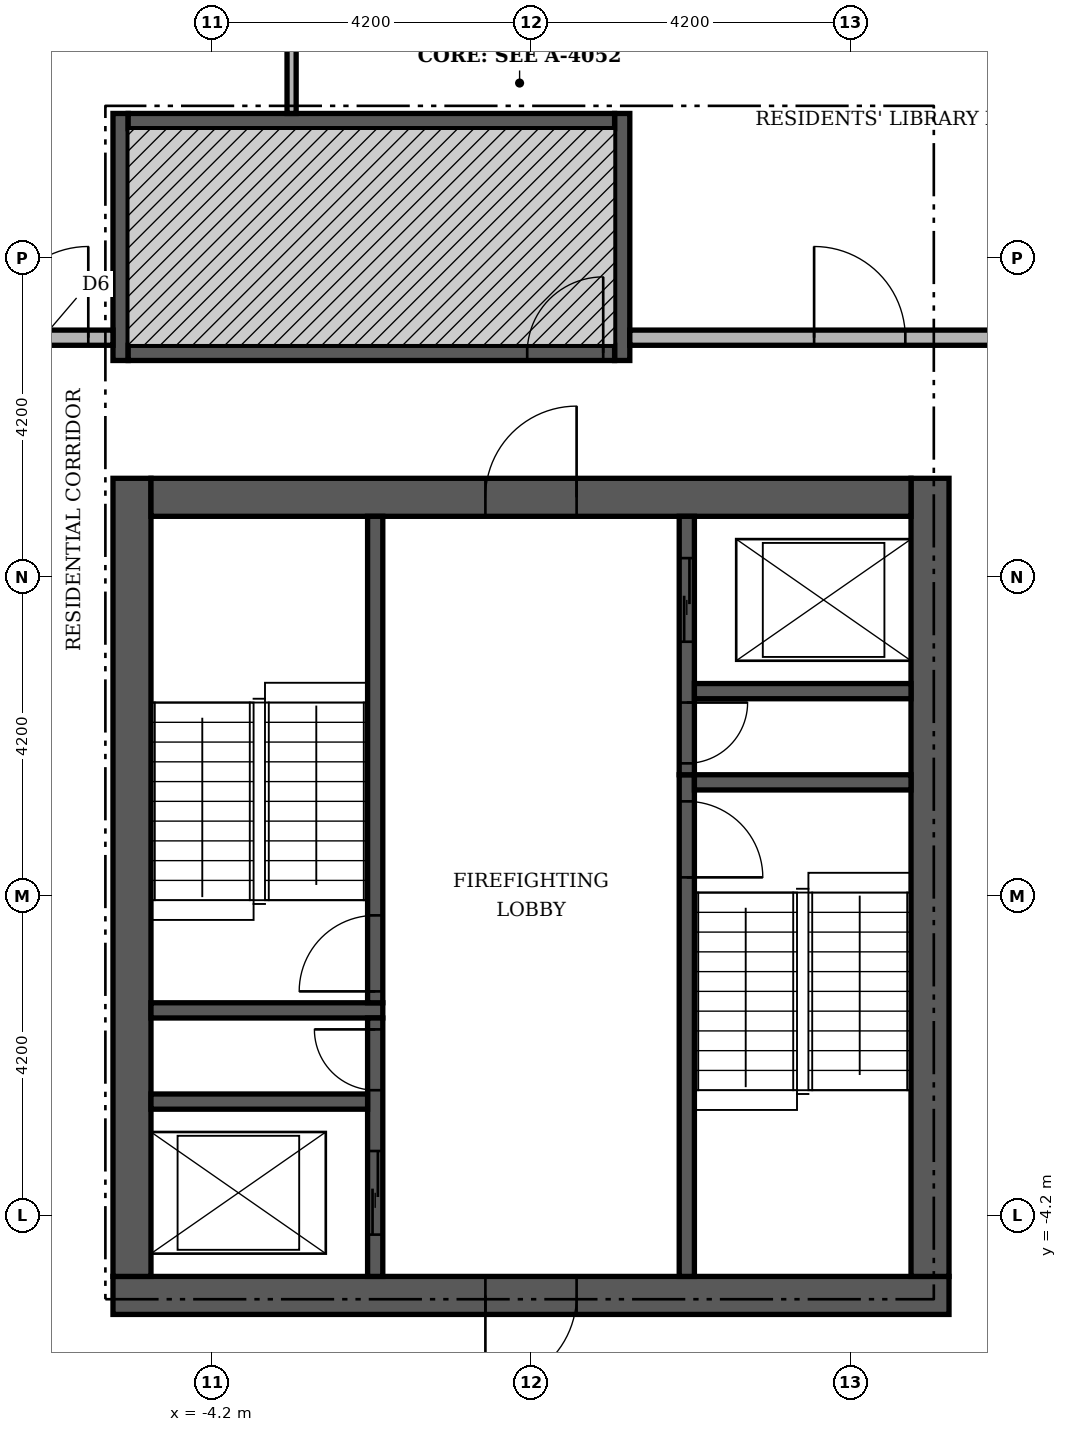
"""IFC4 building model, lengths in metres.
Left out: names, types, materials, properties, quantities, classifications, styles, units other than length and angle.
Written with IfcOpenShell. Run it as: python <this file> out.ifc"""

import sys

from ifc_helpers import new_model, si_unit, direction, frame, frame_2d, origin, place, context, subcontext, project, spatial, rectangle, extrude, element, fill, save


model = new_model("IFC4")
c1 = context("Model", 3, precision=1e-05, world=origin(), true_north=direction((0.0, 1.0)))
c2 = subcontext(c1, "Body", "Model", "MODEL_VIEW")
j1 = project(units=[si_unit("LENGTHUNIT", "METRE"), si_unit("PLANEANGLEUNIT", "RADIAN")], contexts=[c1])
p1 = place(None, origin())
s1 = spatial("IfcSite", under=j1, at=p1, CompositionType="ELEMENT")
p2 = place(p1, origin())
s2 = spatial("IfcBuilding", under=s1, at=p2, CompositionType="ELEMENT")
p3 = place(p2, frame((0.0, 0.0, 312.3)))
s3 = spatial("IfcBuildingStorey", under=s2, at=p3, CompositionType="ELEMENT", Elevation=312.3)
p4 = place(p3, frame((-5.5, -5.25, 0.0), z_axis=(0.0, 0.0, 1.0), x_axis=(1.0, 0.0, 0.0)))
e1 = element("IfcWall", 1, at=p4, inside=s3, PredefinedType="SHEAR", context=c2, shape_type="SweptSolid", body=[
    extrude(rectangle(XDim=11.0, YDim=0.5, at=frame_2d((5.5, 0.0))), origin(), (0.0, 0.0, 1.0), 3.55),
])
p5 = place(p4, frame((4.9, 0.0, 0.0)))
e2 = element("IfcOpeningElement", 2, at=p5, cuts=e1, PredefinedType="OPENING", context=c2, shape_type="SweptSolid", body=[
    extrude(rectangle(XDim=1.2, YDim=2.1, at=frame_2d((0.6, 1.05))), frame((0.0, 0.26, 0.0), z_axis=(0.0, -1.0, 0.0), x_axis=(1.0, 0.0, 0.0)), (0.0, 0.0, 1.0), 0.52),
])
for number, where, z_axis, x_axis in (
    (3, (-5.25, -5.0, 0.0), (0.0, 0.0, 1.0), (0.0, 1.0, 0.0)),
    (4, (5.25, -5.0, 0.0), (0.0, 0.0, 1.0), (0.0, 1.0, 0.0)),
):
    element("IfcWall", number, at=place(p3, frame(where, z_axis=z_axis, x_axis=x_axis)), inside=s3, PredefinedType="SHEAR", context=c2, shape_type="SweptSolid", body=[
        extrude(rectangle(XDim=10.5, YDim=0.5, at=frame_2d((5.25, 0.0))), origin(), (0.0, 0.0, 1.0), 3.55),
    ])
p6 = place(p3, frame((-5.0, 5.25, 0.0), z_axis=(0.0, 0.0, 1.0), x_axis=(1.0, 0.0, 0.0)))
e5 = element("IfcWall", 5, at=p6, inside=s3, PredefinedType="SHEAR", context=c2, shape_type="SweptSolid", body=[
    extrude(rectangle(XDim=10.0, YDim=0.5, at=frame_2d((5.0, 0.0))), origin(), (0.0, 0.0, 1.0), 3.55),
])
p7 = place(p6, frame((4.4, 0.0, 0.0)))
e6 = element("IfcOpeningElement", 6, at=p7, cuts=e5, PredefinedType="OPENING", context=c2, shape_type="SweptSolid", body=[
    extrude(rectangle(XDim=1.2, YDim=2.1, at=frame_2d((0.6, 1.05))), frame((0.0, 0.26, 0.0), z_axis=(0.0, -1.0, 0.0), x_axis=(1.0, 0.0, 0.0)), (0.0, 0.0, 1.0), 0.52),
])
p8 = place(p3, frame((2.05, -5.0, 0.0), z_axis=(0.0, 0.0, 1.0), x_axis=(0.0, 1.0, 0.0)))
e7 = element("IfcWall", 7, at=p8, inside=s3, PredefinedType="SHEAR", context=c2, shape_type="SweptSolid", body=[
    extrude(rectangle(XDim=6.6, YDim=0.2, at=frame_2d((3.3, 0.0))), origin(), (0.0, 0.0, 1.0), 3.55),
])
p9 = place(p8, frame((5.25, 0.0, 0.0)))
e8 = element("IfcOpeningElement", 8, at=p9, cuts=e7, PredefinedType="OPENING", context=c2, shape_type="SweptSolid", body=[
    extrude(rectangle(XDim=1.0, YDim=2.1, at=frame_2d((0.5, 1.05))), frame((0.0, 0.11, 0.0), z_axis=(0.0, -1.0, 0.0), x_axis=(1.0, 0.0, 0.0)), (0.0, 0.0, 1.0), 0.22),
])
p10 = place(p3, frame((-5.0, -1.5, 0.0), z_axis=(0.0, 0.0, 1.0), x_axis=(1.0, 0.0, 0.0)))
e9 = element("IfcWall", 9, at=p10, inside=s3, PredefinedType="SHEAR", context=c2, shape_type="SweptSolid", body=[
    extrude(rectangle(XDim=3.05, YDim=0.2, at=frame_2d((1.525, 0.0))), origin(), (0.0, 0.0, 1.0), 3.55),
])
p11 = place(p3, frame((-2.05, -1.4, 0.0), z_axis=(0.0, 0.0, 1.0), x_axis=(0.0, 1.0, 0.0)))
e10 = element("IfcWall", 10, at=p11, inside=s3, PredefinedType="SHEAR", context=c2, shape_type="SweptSolid", body=[
    extrude(rectangle(XDim=6.4, YDim=0.2, at=frame_2d((3.2, 0.0))), origin(), (0.0, 0.0, 1.0), 3.55),
])
p12 = place(p11, frame((0.15, 0.0, 0.0)))
e11 = element("IfcOpeningElement", 11, at=p12, cuts=e10, PredefinedType="OPENING", context=c2, shape_type="SweptSolid", body=[
    extrude(rectangle(XDim=1.0, YDim=2.1, at=frame_2d((0.5, 1.05))), frame((0.0, 0.11, 0.0), z_axis=(0.0, -1.0, 0.0), x_axis=(1.0, 0.0, 0.0)), (0.0, 0.0, 1.0), 0.22),
])
p13 = place(p3, frame((2.15, 1.5, 0.0), z_axis=(0.0, 0.0, 1.0), x_axis=(1.0, 0.0, 0.0)))
e12 = element("IfcWall", 12, at=p13, inside=s3, PredefinedType="SHEAR", context=c2, shape_type="SweptSolid", body=[
    extrude(rectangle(XDim=2.85, YDim=0.2, at=frame_2d((1.425, 0.0))), origin(), (0.0, 0.0, 1.0), 3.55),
])
p14 = place(p3, frame((-2.05, -5.0, 0.0), z_axis=(0.0, 0.0, 1.0), x_axis=(0.0, 1.0, 0.0)))
e13 = element("IfcWall", 13, at=p14, inside=s3, PredefinedType="SHEAR", context=c2, shape_type="SweptSolid", body=[
    extrude(rectangle(XDim=3.4, YDim=0.2, at=frame_2d((1.7, 0.0))), origin(), (0.0, 0.0, 1.0), 3.55),
])
p15 = place(p14, frame((0.55, 0.0, 0.0)))
e14 = element("IfcOpeningElement", 14, at=p15, cuts=e13, PredefinedType="OPENING", context=c2, shape_type="SweptSolid", body=[
    extrude(rectangle(XDim=1.1, YDim=2.1, at=frame_2d((0.55, 1.05))), frame((0.0, 0.11, 0.0), z_axis=(0.0, -1.0, 0.0), x_axis=(1.0, 0.0, 0.0)), (0.0, 0.0, 1.0), 0.22),
])
p16 = place(p14, frame((2.45, 0.0, 0.0)))
e15 = element("IfcOpeningElement", 15, at=p16, cuts=e13, PredefinedType="OPENING", context=c2, shape_type="SweptSolid", body=[
    extrude(rectangle(XDim=0.8, YDim=2.1, at=frame_2d((0.4, 1.05))), frame((0.0, 0.11, 0.0), z_axis=(0.0, -1.0, 0.0), x_axis=(1.0, 0.0, 0.0)), (0.0, 0.0, 1.0), 0.22),
])
p17 = place(p3, frame((-5.0, -2.7, 0.0), z_axis=(0.0, 0.0, 1.0), x_axis=(1.0, 0.0, 0.0)))
e16 = element("IfcWall", 16, at=p17, inside=s3, PredefinedType="SHEAR", context=c2, shape_type="SweptSolid", body=[
    extrude(rectangle(XDim=2.85, YDim=0.2, at=frame_2d((1.425, 0.0))), origin(), (0.0, 0.0, 1.0), 3.55),
])
p18 = place(p3, frame((2.05, 1.6, 0.0), z_axis=(0.0, 0.0, 1.0), x_axis=(0.0, 1.0, 0.0)))
e17 = element("IfcWall", 17, at=p18, inside=s3, PredefinedType="SHEAR", context=c2, shape_type="SweptSolid", body=[
    extrude(rectangle(XDim=3.4, YDim=0.2, at=frame_2d((1.7, 0.0))), origin(), (0.0, 0.0, 1.0), 3.55),
])
p19 = place(p18, frame((1.75, 0.0, 0.0)))
e18 = element("IfcOpeningElement", 18, at=p19, cuts=e17, PredefinedType="OPENING", context=c2, shape_type="SweptSolid", body=[
    extrude(rectangle(XDim=1.1, YDim=2.1, at=frame_2d((0.55, 1.05))), frame((0.0, 0.11, 0.0), z_axis=(0.0, -1.0, 0.0), x_axis=(1.0, 0.0, 0.0)), (0.0, 0.0, 1.0), 0.22),
])
p20 = place(p18, frame((0.15, 0.0, 0.0)))
e19 = element("IfcOpeningElement", 19, at=p20, cuts=e17, PredefinedType="OPENING", context=c2, shape_type="SweptSolid", body=[
    extrude(rectangle(XDim=0.8, YDim=2.1, at=frame_2d((0.4, 1.05))), frame((0.0, 0.11, 0.0), z_axis=(0.0, -1.0, 0.0), x_axis=(1.0, 0.0, 0.0)), (0.0, 0.0, 1.0), 0.22),
])
p21 = place(p3, frame((2.15, 2.7, 0.0), z_axis=(0.0, 0.0, 1.0), x_axis=(1.0, 0.0, 0.0)))
e20 = element("IfcWall", 20, at=p21, inside=s3, PredefinedType="SHEAR", context=c2, shape_type="SweptSolid", body=[
    extrude(rectangle(XDim=2.85, YDim=0.2, at=frame_2d((1.425, 0.0))), origin(), (0.0, 0.0, 1.0), 3.55),
])
for number, where, z_axis, x_axis in (
    (21, (-5.4, 7.05, 0.0), (0.0, 0.0, 1.0), (0.0, 1.0, 0.0)),
    (22, (1.2, 7.05, 0.0), (0.0, 0.0, 1.0), (0.0, 1.0, 0.0)),
):
    element("IfcWall", number, at=place(p3, frame(where, z_axis=z_axis, x_axis=x_axis)), inside=s3, PredefinedType="SHEAR", context=c2, shape_type="SweptSolid", body=[
        extrude(rectangle(XDim=3.25, YDim=0.2, at=frame_2d((1.625, 0.0))), origin(), (0.0, 0.0, 1.0), 3.55),
    ])
p22 = place(p3, frame((-5.3, 7.15, 0.0), z_axis=(0.0, 0.0, 1.0), x_axis=(1.0, 0.0, 0.0)))
e23 = element("IfcWall", 23, at=p22, inside=s3, PredefinedType="SHEAR", context=c2, shape_type="SweptSolid", body=[
    extrude(rectangle(XDim=6.4, YDim=0.2, at=frame_2d((3.2, 0.0))), origin(), (0.0, 0.0, 1.0), 3.55),
])
p23 = place(p22, frame((5.25, 0.0, 0.0)))
e24 = element("IfcOpeningElement", 24, at=p23, cuts=e23, PredefinedType="OPENING", context=c2, shape_type="SweptSolid", body=[
    extrude(rectangle(XDim=1.0, YDim=2.1, at=frame_2d((0.5, 1.05))), frame((0.0, 0.11, 0.0), z_axis=(0.0, -1.0, 0.0), x_axis=(1.0, 0.0, 0.0)), (0.0, 0.0, 1.0), 0.22),
])
p24 = place(p3, frame((-5.3, 10.2, 0.0), z_axis=(0.0, 0.0, 1.0), x_axis=(1.0, 0.0, 0.0)))
e25 = element("IfcWall", 25, at=p24, inside=s3, PredefinedType="SHEAR", context=c2, shape_type="SweptSolid", body=[
    extrude(rectangle(XDim=6.4, YDim=0.2, at=frame_2d((3.2, 0.0))), origin(), (0.0, 0.0, 1.0), 3.55),
])
p25 = place(p3, frame((-7.35, 7.35, 0.0), z_axis=(0.0, 0.0, 1.0), x_axis=(1.0, 0.0, 0.0)))
e26 = element("IfcWall", 26, at=p25, inside=s3, PredefinedType="PARTITIONING", context=c2, shape_type="SweptSolid", body=[
    extrude(rectangle(XDim=1.85, YDim=0.2, at=frame_2d((0.925, 0.0))), origin(), (0.0, 0.0, 1.0), 3.55),
])
p26 = place(p25, frame((0.325, 0.0, 0.0)))
e27 = element("IfcOpeningElement", 27, at=p26, cuts=e26, PredefinedType="OPENING", context=c2, shape_type="SweptSolid", body=[
    extrude(rectangle(XDim=1.2, YDim=2.1, at=frame_2d((0.6, 1.05))), frame((0.0, 0.11, 0.0), z_axis=(0.0, -1.0, 0.0), x_axis=(1.0, 0.0, 0.0)), (0.0, 0.0, 1.0), 0.22),
])
p27 = place(p3, frame((1.3, 7.35, 0.0), z_axis=(0.0, 0.0, 1.0), x_axis=(1.0, 0.0, 0.0)))
e28 = element("IfcWall", 28, at=p27, inside=s3, PredefinedType="PARTITIONING", context=c2, shape_type="SweptSolid", body=[
    extrude(rectangle(XDim=6.05, YDim=0.2, at=frame_2d((3.025, 0.0))), origin(), (0.0, 0.0, 1.0), 3.55),
])
p28 = place(p27, frame((2.425, 0.0, 0.0)))
e29 = element("IfcOpeningElement", 29, at=p28, cuts=e28, PredefinedType="OPENING", context=c2, shape_type="SweptSolid", body=[
    extrude(rectangle(XDim=1.2, YDim=2.1, at=frame_2d((0.6, 1.05))), frame((0.0, 0.11, 0.0), z_axis=(0.0, -1.0, 0.0), x_axis=(1.0, 0.0, 0.0)), (0.0, 0.0, 1.0), 0.22),
])
p29 = place(p3, frame((-3.15, 10.3, 0.0), z_axis=(0.0, 0.0, 1.0), x_axis=(0.0, 1.0, 0.0)))
e30 = element("IfcWall", 30, at=p29, inside=s3, PredefinedType="PARTITIONING", context=c2, shape_type="SweptSolid", body=[
    extrude(rectangle(XDim=2.6, YDim=0.12, at=frame_2d((1.3, 0.0))), origin(), (0.0, 0.0, 1.0), 3.55),
])
p30 = place(p19, origin())
e31 = element("IfcDoor", 31, at=p30, inside=s3, OperationType="SLIDING_TO_LEFT", PredefinedType="DOOR", context=c2, shape_type="SweptSolid", body=[
    extrude(rectangle(XDim=1.1, YDim=2.1, at=frame_2d((0.55, 1.05))), frame((0.0, 0.025, 0.0), z_axis=(0.0, -1.0, 0.0), x_axis=(1.0, 0.0, 0.0)), (0.0, 0.0, 1.0), 0.05),
])
fill(e18, e31)
p31 = place(p15, origin())
e32 = element("IfcDoor", 32, at=p31, inside=s3, OperationType="SLIDING_TO_LEFT", PredefinedType="DOOR", context=c2, shape_type="SweptSolid", body=[
    extrude(rectangle(XDim=1.1, YDim=2.1, at=frame_2d((0.55, 1.05))), frame((0.0, 0.025, 0.0), z_axis=(0.0, -1.0, 0.0), x_axis=(1.0, 0.0, 0.0)), (0.0, 0.0, 1.0), 0.05),
])
fill(e14, e32)
p32 = place(p12, origin())
e33 = element("IfcDoor", 33, at=p32, inside=s3, OperationType="SINGLE_SWING_LEFT", PredefinedType="DOOR", context=c2, shape_type="SweptSolid", body=[
    extrude(rectangle(XDim=1.0, YDim=2.1, at=frame_2d((0.5, 1.05))), frame((0.0, 0.025, 0.0), z_axis=(0.0, -1.0, 0.0), x_axis=(1.0, 0.0, 0.0)), (0.0, 0.0, 1.0), 0.05),
])
fill(e11, e33)
p33 = place(p9, frame((1.0, 0.0, 0.0), z_axis=(0.0, 0.0, 1.0), x_axis=(-1.0, 0.0, 0.0)))
e34 = element("IfcDoor", 34, at=p33, inside=s3, OperationType="SINGLE_SWING_LEFT", PredefinedType="DOOR", context=c2, shape_type="SweptSolid", body=[
    extrude(rectangle(XDim=1.0, YDim=2.1, at=frame_2d((0.5, 1.05))), frame((0.0, 0.025, 0.0), z_axis=(0.0, -1.0, 0.0), x_axis=(1.0, 0.0, 0.0)), (0.0, 0.0, 1.0), 0.05),
])
fill(e8, e34)
p34 = place(p20, frame((0.8, 0.0, 0.0), z_axis=(0.0, 0.0, 1.0), x_axis=(-1.0, 0.0, 0.0)))
e35 = element("IfcDoor", 35, at=p34, inside=s3, OperationType="SINGLE_SWING_RIGHT", PredefinedType="DOOR", context=c2, shape_type="SweptSolid", body=[
    extrude(rectangle(XDim=0.8, YDim=2.1, at=frame_2d((0.4, 1.05))), frame((0.0, 0.025, 0.0), z_axis=(0.0, -1.0, 0.0), x_axis=(1.0, 0.0, 0.0)), (0.0, 0.0, 1.0), 0.05),
])
fill(e19, e35)
p35 = place(p16, origin())
e36 = element("IfcDoor", 36, at=p35, inside=s3, OperationType="SINGLE_SWING_RIGHT", PredefinedType="DOOR", context=c2, shape_type="SweptSolid", body=[
    extrude(rectangle(XDim=0.8, YDim=2.1, at=frame_2d((0.4, 1.05))), frame((0.0, 0.025, 0.0), z_axis=(0.0, -1.0, 0.0), x_axis=(1.0, 0.0, 0.0)), (0.0, 0.0, 1.0), 0.05),
])
fill(e15, e36)
p36 = place(p23, origin())
e37 = element("IfcDoor", 37, at=p36, inside=s3, OperationType="SINGLE_SWING_RIGHT", PredefinedType="DOOR", context=c2, shape_type="SweptSolid", body=[
    extrude(rectangle(XDim=1.0, YDim=2.1, at=frame_2d((0.5, 1.05))), frame((0.0, 0.025, 0.0), z_axis=(0.0, -1.0, 0.0), x_axis=(1.0, 0.0, 0.0)), (0.0, 0.0, 1.0), 0.05),
])
fill(e24, e37)
p37 = place(p7, origin())
e38 = element("IfcDoor", 38, at=p37, inside=s3, OperationType="SINGLE_SWING_RIGHT", PredefinedType="DOOR", context=c2, shape_type="SweptSolid", body=[
    extrude(rectangle(XDim=1.2, YDim=2.1, at=frame_2d((0.6, 1.05))), frame((0.0, 0.025, 0.0), z_axis=(0.0, -1.0, 0.0), x_axis=(1.0, 0.0, 0.0)), (0.0, 0.0, 1.0), 0.05),
])
fill(e6, e38)
p38 = place(p5, frame((1.2, 0.0, 0.0), z_axis=(0.0, 0.0, 1.0), x_axis=(-1.0, 0.0, 0.0)))
e39 = element("IfcDoor", 39, at=p38, inside=s3, OperationType="SINGLE_SWING_LEFT", PredefinedType="DOOR", context=c2, shape_type="SweptSolid", body=[
    extrude(rectangle(XDim=1.2, YDim=2.1, at=frame_2d((0.6, 1.05))), frame((0.0, 0.025, 0.0), z_axis=(0.0, -1.0, 0.0), x_axis=(1.0, 0.0, 0.0)), (0.0, 0.0, 1.0), 0.05),
])
fill(e2, e39)
p39 = place(p28, origin())
e40 = element("IfcDoor", 40, at=p39, inside=s3, OperationType="SINGLE_SWING_LEFT", PredefinedType="DOOR", context=c2, shape_type="SweptSolid", body=[
    extrude(rectangle(XDim=1.2, YDim=2.1, at=frame_2d((0.6, 1.05))), frame((0.0, 0.025, 0.0), z_axis=(0.0, -1.0, 0.0), x_axis=(1.0, 0.0, 0.0)), (0.0, 0.0, 1.0), 0.05),
])
fill(e29, e40)
p40 = place(p26, origin())
e41 = element("IfcDoor", 41, at=p40, inside=s3, OperationType="SINGLE_SWING_RIGHT", PredefinedType="DOOR", context=c2, shape_type="SweptSolid", body=[
    extrude(rectangle(XDim=1.2, YDim=2.1, at=frame_2d((0.6, 1.05))), frame((0.0, 0.025, 0.0), z_axis=(0.0, -1.0, 0.0), x_axis=(1.0, 0.0, 0.0)), (0.0, 0.0, 1.0), 0.05),
])
fill(e27, e41)
save(model, sys.argv[1])
